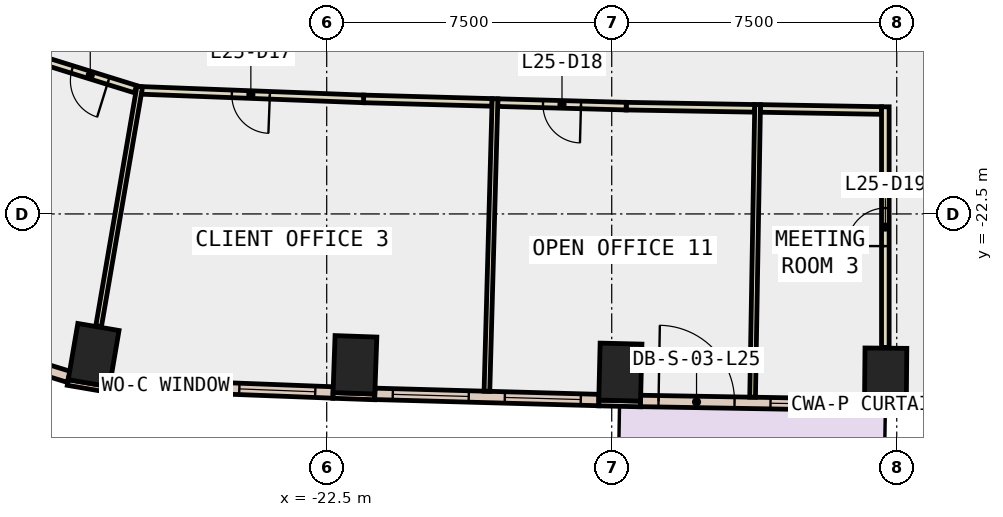
"""IFC4 building model, lengths in metres.
Left out: names, types, materials, properties, quantities, classifications, styles, units other than length and angle.
Written with IfcOpenShell. Run it as: python <this file> out.ifc"""

import sys

from ifc_helpers import new_model, si_unit, direction, frame, frame_2d, origin, origin_2d, place, context, subcontext, project, spatial, rectangle, extrude, element, fill, save


model = new_model("IFC4")
c1 = context("Model", 3, precision=1e-05, world=origin(), true_north=direction((0.0, 1.0)))
c2 = subcontext(c1, "Body", "Model", "MODEL_VIEW")
j1 = project(units=[si_unit("LENGTHUNIT", "METRE"), si_unit("PLANEANGLEUNIT", "RADIAN")], contexts=[c1])
p1 = place(None, origin())
s1 = spatial("IfcSite", under=j1, at=p1, CompositionType="ELEMENT")
p2 = place(p1, origin())
s2 = spatial("IfcBuilding", under=s1, at=p2, CompositionType="ELEMENT")
p3 = place(p2, frame((0.0, 0.0, 116.0)))
s3 = spatial("IfcBuildingStorey", under=s2, at=p3, CompositionType="ELEMENT", Elevation=116.0)
for number, where, z_axis, x_axis in (
    (1, (-28.633, -26.214, -0.4), (0.0, 0.0, 1.0), (-0.986, 0.168, 0.0)),
    (2, (-21.757, -26.47, -0.4), (0.0, 0.0, 1.0), (-0.999, 0.035, 0.0)),
    (3, (-14.773, -26.662, -0.4), (0.0, 0.0, 1.0), (-1.0, 0.024, 0.0)),
    (4, (-7.792, -26.782, -0.4), (0.0, 0.0, 1.0), (-1.0, 0.009, 0.0)),
):
    element("IfcColumn", number, at=place(p3, frame(where, z_axis=z_axis, x_axis=x_axis)), inside=s3, PredefinedType="COLUMN", context=c2, shape_type="SweptSolid", body=[
        extrude(rectangle(XDim=1.1, YDim=1.5, at=origin_2d()), origin(), (0.0, 0.0, 1.0), 4.2),
    ])
p4 = place(p3, frame((-29.314, -26.935, 0.0), z_axis=(0.0, 0.0, 1.0), x_axis=(0.985763338892, -0.168138751323, 0.0)))
e5 = element("IfcWall", 5, at=p4, inside=s3, PredefinedType="STANDARD", context=c2, shape_type="SweptSolid", body=[
    extrude(rectangle(XDim=1.101, YDim=0.15, at=frame_2d((0.55, 0.0))), origin(), (0.0, 0.0, 1.0), 3.8),
])
p5 = place(p3, frame((-22.336, -27.275, 0.0), z_axis=(0.0, 0.0, 1.0), x_axis=(0.999368780235, -0.035525217693, 0.0)))
e6 = element("IfcWall", 6, at=p5, inside=s3, PredefinedType="STANDARD", context=c2, shape_type="SweptSolid", body=[
    extrude(rectangle(XDim=1.1, YDim=0.15, at=frame_2d((0.55, 0.0))), origin(), (0.0, 0.0, 1.0), 3.8),
])
p6 = place(p3, frame((-15.343, -27.474, 0.0), z_axis=(0.0, 0.0, 1.0), x_axis=(0.999723421029, -0.023517683673, 0.0)))
e7 = element("IfcWall", 7, at=p6, inside=s3, PredefinedType="STANDARD", context=c2, shape_type="SweptSolid", body=[
    extrude(rectangle(XDim=1.1, YDim=0.15, at=frame_2d((0.55, 0.0))), origin(), (0.0, 0.0, 1.0), 3.8),
])
p7 = place(p3, frame((-8.349, -27.602, 0.0), z_axis=(0.0, 0.0, 1.0), x_axis=(0.99995860686, -0.009098602504, 0.0)))
e8 = element("IfcWall", 8, at=p7, inside=s3, PredefinedType="STANDARD", context=c2, shape_type="SweptSolid", body=[
    extrude(rectangle(XDim=1.1, YDim=0.15, at=frame_2d((0.55, 0.0))), origin(), (0.0, 0.0, 1.0), 3.8),
])
p8 = place(p3, frame((-28.205, -26.973, 0.0), z_axis=(0.0, 0.0, 1.0), x_axis=(0.999266319694, -0.03829911651, 0.0)))
e9 = element("IfcWall", 9, at=p8, inside=s3, PredefinedType="STANDARD", context=c2, shape_type="SweptSolid", body=[
    extrude(rectangle(XDim=5.877, YDim=0.3, at=frame_2d((2.939, 0.0))), origin(), (0.0, 0.0, 1.0), 3.8),
])
p9 = place(p8, frame((0.469, 0.0, 0.9)))
e10 = element("IfcOpeningElement", 10, at=p9, cuts=e9, PredefinedType="OPENING", context=c2, shape_type="SweptSolid", body=[
    extrude(rectangle(XDim=2.0, YDim=2.6, at=frame_2d((1.0, 1.3))), frame((0.0, 0.16, 0.0), z_axis=(0.0, -1.0, 0.0), x_axis=(1.0, 0.0, 0.0)), (0.0, 0.0, 1.0), 0.32),
])
p10 = place(p8, frame((3.408, 0.0, 0.9)))
e11 = element("IfcOpeningElement", 11, at=p10, cuts=e9, PredefinedType="OPENING", context=c2, shape_type="SweptSolid", body=[
    extrude(rectangle(XDim=2.0, YDim=2.6, at=frame_2d((1.0, 1.3))), frame((0.0, 0.16, 0.0), z_axis=(0.0, -1.0, 0.0), x_axis=(1.0, 0.0, 0.0)), (0.0, 0.0, 1.0), 0.32),
])
p11 = place(p3, frame((-21.235, -27.234, 0.0), z_axis=(0.0, 0.0, 1.0), x_axis=(0.999617542368, -0.027654456983, 0.0)))
e12 = element("IfcWall", 12, at=p11, inside=s3, PredefinedType="STANDARD", context=c2, shape_type="SweptSolid", body=[
    extrude(rectangle(XDim=5.897, YDim=0.3, at=frame_2d((2.949, 0.0))), origin(), (0.0, 0.0, 1.0), 3.8),
])
p12 = place(p11, frame((0.474, 0.0, 0.9)))
e13 = element("IfcOpeningElement", 13, at=p12, cuts=e12, PredefinedType="OPENING", context=c2, shape_type="SweptSolid", body=[
    extrude(rectangle(XDim=2.0, YDim=2.6, at=frame_2d((1.0, 1.3))), frame((0.0, 0.16, 0.0), z_axis=(0.0, -1.0, 0.0), x_axis=(1.0, 0.0, 0.0)), (0.0, 0.0, 1.0), 0.32),
])
p13 = place(p11, frame((3.423, 0.0, 0.9)))
e14 = element("IfcOpeningElement", 14, at=p13, cuts=e12, PredefinedType="OPENING", context=c2, shape_type="SweptSolid", body=[
    extrude(rectangle(XDim=2.0, YDim=2.6, at=frame_2d((1.0, 1.3))), frame((0.0, 0.16, 0.0), z_axis=(0.0, -1.0, 0.0), x_axis=(1.0, 0.0, 0.0)), (0.0, 0.0, 1.0), 0.32),
])
p14 = place(p3, frame((-14.242, -27.421, 0.0), z_axis=(0.0, 0.0, 1.0), x_axis=(0.999850142513, -0.017311629508, 0.0)))
e15 = element("IfcWall", 15, at=p14, inside=s3, PredefinedType="STANDARD", context=c2, shape_type="SweptSolid", body=[
    extrude(rectangle(XDim=5.895, YDim=0.3, at=frame_2d((2.948, 0.0))), origin(), (0.0, 0.0, 1.0), 3.8),
])
p15 = place(p14, frame((0.474, 0.0, 0.0)))
e16 = element("IfcOpeningElement", 16, at=p15, cuts=e15, PredefinedType="OPENING", context=c2, shape_type="SweptSolid", body=[
    extrude(rectangle(XDim=2.0, YDim=2.4, at=frame_2d((1.0, 1.2))), frame((0.0, 0.16, 0.0), z_axis=(0.0, -1.0, 0.0), x_axis=(1.0, 0.0, 0.0)), (0.0, 0.0, 1.0), 0.32),
])
p16 = place(p14, frame((3.421, 0.0, 0.9)))
e17 = element("IfcOpeningElement", 17, at=p16, cuts=e15, PredefinedType="OPENING", context=c2, shape_type="SweptSolid", body=[
    extrude(rectangle(XDim=2.0, YDim=2.6, at=frame_2d((1.0, 1.3))), frame((0.0, 0.16, 0.0), z_axis=(0.0, -1.0, 0.0), x_axis=(1.0, 0.0, 0.0)), (0.0, 0.0, 1.0), 0.32),
])
p17 = place(p3, frame((-33.294, -25.542, 0.0), z_axis=(0.0, 0.0, 1.0), x_axis=(0.954955020021, -0.296750585066, 0.0)))
e18 = element("IfcWall", 18, at=p17, inside=s3, PredefinedType="STANDARD", context=c2, shape_type="SweptSolid", body=[
    extrude(rectangle(XDim=4.196, YDim=0.3, at=frame_2d((2.098, 0.0))), origin(), (0.0, 0.0, 1.0), 3.8),
])
p18 = place(p17, frame((1.398, 0.0, 0.9)))
e19 = element("IfcOpeningElement", 19, at=p18, cuts=e18, PredefinedType="OPENING", context=c2, shape_type="SweptSolid", body=[
    extrude(rectangle(XDim=1.4, YDim=2.6, at=frame_2d((0.7, 1.3))), frame((0.0, 0.16, 0.0), z_axis=(0.0, -1.0, 0.0), x_axis=(1.0, 0.0, 0.0)), (0.0, 0.0, 1.0), 0.32),
])
p19 = place(p3, frame((-27.533, -19.217, 0.0), z_axis=(0.0, 0.0, 1.0), x_axis=(-0.954946345159, 0.296778499671, 0.0)))
e20 = element("IfcWall", 20, at=p19, inside=s3, PredefinedType="PARTITIONING", context=c2, shape_type="SweptSolid", body=[
    extrude(rectangle(XDim=2.49, YDim=0.2, at=frame_2d((1.245, 0.0))), origin(), (0.0, 0.0, 1.0), 3.8),
])
p20 = place(p19, frame((0.745, 0.0, 0.0)))
e21 = element("IfcOpeningElement", 21, at=p20, cuts=e20, PredefinedType="OPENING", context=c2, shape_type="SweptSolid", body=[
    extrude(rectangle(XDim=1.0, YDim=2.1, at=frame_2d((0.5, 1.05))), frame((0.0, 0.11, 0.0), z_axis=(0.0, -1.0, 0.0), x_axis=(1.0, 0.0, 0.0)), (0.0, 0.0, 1.0), 0.22),
])
p21 = place(p3, frame((-18.149, -19.566, 0.0), z_axis=(0.0, 0.0, 1.0), x_axis=(-0.999621568347, 0.027508545868, 0.0)))
e22 = element("IfcWall", 22, at=p21, inside=s3, PredefinedType="PARTITIONING", context=c2, shape_type="SweptSolid", body=[
    extrude(rectangle(XDim=3.381, YDim=0.2, at=frame_2d((1.691, 0.0))), origin(), (0.0, 0.0, 1.0), 3.8),
])
p22 = place(p3, frame((-21.529, -19.473, 0.0), z_axis=(0.0, 0.0, 1.0), x_axis=(-0.999270076349, 0.038200975307, 0.0)))
e23 = element("IfcWall", 23, at=p22, inside=s3, PredefinedType="PARTITIONING", context=c2, shape_type="SweptSolid", body=[
    extrude(rectangle(XDim=5.937, YDim=0.2, at=frame_2d((2.969, 0.0))), origin(), (0.0, 0.0, 1.0), 3.8),
])
p23 = place(p22, frame((2.469, 0.0, 0.0)))
e24 = element("IfcOpeningElement", 24, at=p23, cuts=e23, PredefinedType="OPENING", context=c2, shape_type="SweptSolid", body=[
    extrude(rectangle(XDim=1.0, YDim=2.1, at=frame_2d((0.5, 1.05))), frame((0.0, 0.11, 0.0), z_axis=(0.0, -1.0, 0.0), x_axis=(1.0, 0.0, 0.0)), (0.0, 0.0, 1.0), 0.22),
])
p24 = place(p3, frame((-11.237, -19.722, 0.0), z_axis=(0.0, 0.0, 1.0), x_axis=(-0.999853581081, 0.017111878879, 0.0)))
e25 = element("IfcWall", 25, at=p24, inside=s3, PredefinedType="PARTITIONING", context=c2, shape_type="SweptSolid", body=[
    extrude(rectangle(XDim=3.381, YDim=0.2, at=frame_2d((1.691, 0.0))), origin(), (0.0, 0.0, 1.0), 3.8),
])
p25 = place(p3, frame((-14.618, -19.664, 0.0), z_axis=(0.0, 0.0, 1.0), x_axis=(-0.999621786796, 0.027500606598, 0.0)))
e26 = element("IfcWall", 26, at=p25, inside=s3, PredefinedType="PARTITIONING", context=c2, shape_type="SweptSolid", body=[
    extrude(rectangle(XDim=3.382, YDim=0.2, at=frame_2d((1.691, 0.0))), origin(), (0.0, 0.0, 1.0), 3.8),
])
p26 = place(p25, frame((1.191, 0.0, 0.0)))
e27 = element("IfcOpeningElement", 27, at=p26, cuts=e26, PredefinedType="OPENING", context=c2, shape_type="SweptSolid", body=[
    extrude(rectangle(XDim=1.0, YDim=2.1, at=frame_2d((0.5, 1.05))), frame((0.0, 0.11, 0.0), z_axis=(0.0, -1.0, 0.0), x_axis=(1.0, 0.0, 0.0)), (0.0, 0.0, 1.0), 0.22),
])
p27 = place(p3, frame((-7.9, -19.779, 0.0), z_axis=(0.0, 0.0, 1.0), x_axis=(-0.999851582532, 0.017228259004, 0.0)))
e28 = element("IfcWall", 28, at=p27, inside=s3, PredefinedType="PARTITIONING", context=c2, shape_type="SweptSolid", body=[
    extrude(rectangle(XDim=3.188, YDim=0.2, at=frame_2d((1.594, 0.0))), origin(), (0.0, 0.0, 1.0), 3.8),
])
p28 = place(p3, frame((-7.8, -26.012, 0.0), z_axis=(0.0, 0.0, 1.0), x_axis=(0.0, 1.0, 0.0)))
e29 = element("IfcWall", 29, at=p28, inside=s3, PredefinedType="PARTITIONING", context=c2, shape_type="SweptSolid", body=[
    extrude(rectangle(XDim=6.331, YDim=0.2, at=frame_2d((3.166, 0.0))), origin(), (0.0, 0.0, 1.0), 3.8),
])
p29 = place(p28, frame((2.666, 0.0, 0.0)))
e30 = element("IfcOpeningElement", 30, at=p29, cuts=e29, PredefinedType="OPENING", context=c2, shape_type="SweptSolid", body=[
    extrude(rectangle(XDim=1.0, YDim=2.1, at=frame_2d((0.5, 1.05))), frame((0.0, 0.11, 0.0), z_axis=(0.0, -1.0, 0.0), x_axis=(1.0, 0.0, 0.0)), (0.0, 0.0, 1.0), 0.22),
])
p30 = place(p3, frame((-27.42, -19.148, 0.0), z_axis=(0.0, 0.0, 1.0), x_axis=(-0.169086648341, -0.985601189809, 0.0)))
e31 = element("IfcWall", 31, at=p30, inside=s3, PredefinedType="PARTITIONING", context=c2, shape_type="SweptSolid", body=[
    extrude(rectangle(XDim=6.399, YDim=0.15, at=frame_2d((3.2, 0.0))), origin(), (0.0, 0.0, 1.0), 3.8),
])
p31 = place(p3, frame((-18.071, -19.469, 0.0), z_axis=(0.0, 0.0, 1.0), x_axis=(-0.027648258523, -0.999617713829, 0.0)))
e32 = element("IfcWall", 32, at=p31, inside=s3, PredefinedType="PARTITIONING", context=c2, shape_type="SweptSolid", body=[
    extrude(rectangle(XDim=7.7, YDim=0.15, at=frame_2d((3.85, 0.0))), origin(), (0.0, 0.0, 1.0), 3.8),
])
p32 = place(p3, frame((-11.161, -19.623, 0.0), z_axis=(0.0, 0.0, 1.0), x_axis=(-0.017153017473, -0.999852876173, 0.0)))
e33 = element("IfcWall", 33, at=p32, inside=s3, PredefinedType="PARTITIONING", context=c2, shape_type="SweptSolid", body=[
    extrude(rectangle(XDim=7.7, YDim=0.15, at=frame_2d((3.85, 0.0))), origin(), (0.0, 0.0, 1.0), 3.8),
])
p33 = place(p9, origin())
e34 = element("IfcWindow", 34, at=p33, inside=s3, PartitioningType="SINGLE_PANEL", PredefinedType="WINDOW", context=c2, shape_type="SweptSolid", body=[
    extrude(rectangle(XDim=2.0, YDim=2.6, at=frame_2d((1.0, 1.3))), frame((0.0, 0.03, 0.0), z_axis=(0.0, -1.0, 0.0), x_axis=(1.0, 0.0, 0.0)), (0.0, 0.0, 1.0), 0.06),
])
fill(e10, e34)
p34 = place(p10, origin())
e35 = element("IfcWindow", 35, at=p34, inside=s3, PartitioningType="SINGLE_PANEL", PredefinedType="WINDOW", context=c2, shape_type="SweptSolid", body=[
    extrude(rectangle(XDim=2.0, YDim=2.6, at=frame_2d((1.0, 1.3))), frame((0.0, 0.03, 0.0), z_axis=(0.0, -1.0, 0.0), x_axis=(1.0, 0.0, 0.0)), (0.0, 0.0, 1.0), 0.06),
])
fill(e11, e35)
p35 = place(p12, origin())
e36 = element("IfcWindow", 36, at=p35, inside=s3, PartitioningType="SINGLE_PANEL", PredefinedType="WINDOW", context=c2, shape_type="SweptSolid", body=[
    extrude(rectangle(XDim=2.0, YDim=2.6, at=frame_2d((1.0, 1.3))), frame((0.0, 0.03, 0.0), z_axis=(0.0, -1.0, 0.0), x_axis=(1.0, 0.0, 0.0)), (0.0, 0.0, 1.0), 0.06),
])
fill(e13, e36)
p36 = place(p13, origin())
e37 = element("IfcWindow", 37, at=p36, inside=s3, PartitioningType="SINGLE_PANEL", PredefinedType="WINDOW", context=c2, shape_type="SweptSolid", body=[
    extrude(rectangle(XDim=2.0, YDim=2.6, at=frame_2d((1.0, 1.3))), frame((0.0, 0.03, 0.0), z_axis=(0.0, -1.0, 0.0), x_axis=(1.0, 0.0, 0.0)), (0.0, 0.0, 1.0), 0.06),
])
fill(e14, e37)
p37 = place(p15, origin())
e38 = element("IfcDoor", 38, at=p37, inside=s3, OperationType="SLIDING_TO_LEFT", PredefinedType="DOOR", context=c2, shape_type="SweptSolid", body=[
    extrude(rectangle(XDim=2.0, YDim=2.4, at=frame_2d((1.0, 1.2))), frame((0.0, 0.025, 0.0), z_axis=(0.0, -1.0, 0.0), x_axis=(1.0, 0.0, 0.0)), (0.0, 0.0, 1.0), 0.05),
])
fill(e16, e38)
p38 = place(p16, origin())
e39 = element("IfcWindow", 39, at=p38, inside=s3, PartitioningType="SINGLE_PANEL", PredefinedType="WINDOW", context=c2, shape_type="SweptSolid", body=[
    extrude(rectangle(XDim=2.0, YDim=2.6, at=frame_2d((1.0, 1.3))), frame((0.0, 0.03, 0.0), z_axis=(0.0, -1.0, 0.0), x_axis=(1.0, 0.0, 0.0)), (0.0, 0.0, 1.0), 0.06),
])
fill(e17, e39)
p39 = place(p20, origin())
e40 = element("IfcDoor", 40, at=p39, inside=s3, OperationType="SINGLE_SWING_LEFT", PredefinedType="DOOR", context=c2, shape_type="SweptSolid", body=[
    extrude(rectangle(XDim=1.0, YDim=2.1, at=frame_2d((0.5, 1.05))), frame((0.0, 0.025, 0.0), z_axis=(0.0, -1.0, 0.0), x_axis=(1.0, 0.0, 0.0)), (0.0, 0.0, 1.0), 0.05),
])
fill(e21, e40)
p40 = place(p23, origin())
e41 = element("IfcDoor", 41, at=p40, inside=s3, OperationType="SINGLE_SWING_LEFT", PredefinedType="DOOR", context=c2, shape_type="SweptSolid", body=[
    extrude(rectangle(XDim=1.0, YDim=2.1, at=frame_2d((0.5, 1.05))), frame((0.0, 0.025, 0.0), z_axis=(0.0, -1.0, 0.0), x_axis=(1.0, 0.0, 0.0)), (0.0, 0.0, 1.0), 0.05),
])
fill(e24, e41)
p41 = place(p26, origin())
e42 = element("IfcDoor", 42, at=p41, inside=s3, OperationType="SINGLE_SWING_LEFT", PredefinedType="DOOR", context=c2, shape_type="SweptSolid", body=[
    extrude(rectangle(XDim=1.0, YDim=2.1, at=frame_2d((0.5, 1.05))), frame((0.0, 0.025, 0.0), z_axis=(0.0, -1.0, 0.0), x_axis=(1.0, 0.0, 0.0)), (0.0, 0.0, 1.0), 0.05),
])
fill(e27, e42)
p42 = place(p29, origin())
e43 = element("IfcDoor", 43, at=p42, inside=s3, OperationType="SINGLE_SWING_LEFT", PredefinedType="DOOR", context=c2, shape_type="SweptSolid", body=[
    extrude(rectangle(XDim=1.0, YDim=2.1, at=frame_2d((0.5, 1.05))), frame((0.0, 0.025, 0.0), z_axis=(0.0, -1.0, 0.0), x_axis=(1.0, 0.0, 0.0)), (0.0, 0.0, 1.0), 0.05),
])
fill(e30, e43)
save(model, sys.argv[1])
